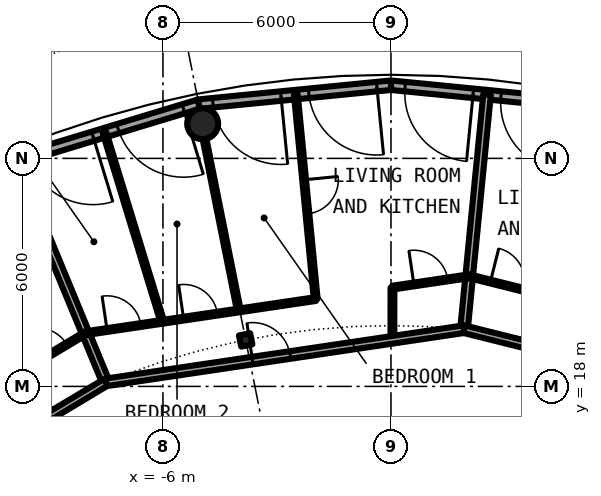
"""IFC4 building model, lengths in metres.
Left out: names, types, materials, properties, quantities, classifications, styles, units other than length and angle.
Written with IfcOpenShell. Run it as: python <this file> out.ifc"""

import sys

from ifc_helpers import new_model, si_unit, direction, frame, frame_2d, origin, origin_2d, place, context, subcontext, project, spatial, rectangle, hollow_circle, i_section, extrude, element, fill, save


model = new_model("IFC4")
c1 = context("Model", 3, precision=1e-05, world=origin(), true_north=direction((0.0, 1.0)))
c2 = subcontext(c1, "Body", "Model", "MODEL_VIEW")
j1 = project(units=[si_unit("LENGTHUNIT", "METRE"), si_unit("PLANEANGLEUNIT", "RADIAN")], contexts=[c1])
p1 = place(None, origin())
s1 = spatial("IfcSite", under=j1, at=p1, CompositionType="ELEMENT")
p2 = place(p1, origin())
s2 = spatial("IfcBuilding", under=s1, at=p2, CompositionType="ELEMENT")
p3 = place(p2, frame((0.0, 0.0, 237.1)))
s3 = spatial("IfcBuildingStorey", under=s2, at=p3, CompositionType="ELEMENT", Elevation=237.1)
p4 = place(p3, frame((-4.955, 24.912, 0.0), z_axis=(0.0, 0.0, 1.0), x_axis=(1.0, 0.0, 0.0)))
e1 = element("IfcColumn", 1, at=p4, inside=s3, PredefinedType="COLUMN", context=c2, shape_type="SweptSolid", body=[
    extrude(hollow_circle(Radius=0.406, WallThickness=0.03, at=origin_2d()), origin(), (0.0, 0.0, 1.0), 3.05),
])
p5 = place(p3, frame((-3.824, 19.223, 0.0), z_axis=(0.0, 0.0, 1.0), x_axis=(-0.195090322016, 0.980785280403, 0.0)))
e2 = element("IfcColumn", 2, at=p5, inside=s3, PredefinedType="COLUMN", context=c2, shape_type="SweptSolid", body=[
    extrude(i_section(OverallWidth=0.3, OverallDepth=0.3, WebThickness=0.011, FlangeThickness=0.019, FilletRadius=0.027, at=origin_2d()), origin(), (0.0, 0.0, 1.0), 3.05),
])
p6 = place(p3, frame((5.058, 25.427, 0.0), z_axis=(0.0, 0.0, 1.0), x_axis=(-0.995187279479, 0.097991217788, 0.0)))
e3 = element("IfcWall", 3, at=p6, inside=s3, PredefinedType="SOLIDWALL", context=c2, shape_type="SweptSolid", body=[
    extrude(rectangle(XDim=5.083, YDim=0.25, at=frame_2d((2.541, 0.0))), origin(), (0.0, 0.0, 1.0), 2.7),
])
p7 = place(p6, frame((0.374, 0.0, 0.0)))
e4 = element("IfcOpeningElement", 4, at=p7, cuts=e3, PredefinedType="OPENING", context=c2, shape_type="SweptSolid", body=[
    extrude(rectangle(XDim=1.8, YDim=2.2, at=frame_2d((0.9, 1.1))), frame((0.0, 0.135, 0.0), z_axis=(0.0, -1.0, 0.0), x_axis=(1.0, 0.0, 0.0)), (0.0, 0.0, 1.0), 0.27),
])
p8 = place(p6, frame((2.909, 0.0, 0.0)))
e5 = element("IfcOpeningElement", 5, at=p8, cuts=e3, PredefinedType="OPENING", context=c2, shape_type="SweptSolid", body=[
    extrude(rectangle(XDim=1.8, YDim=2.2, at=frame_2d((0.9, 1.1))), frame((0.0, 0.135, 0.0), z_axis=(0.0, -1.0, 0.0), x_axis=(1.0, 0.0, 0.0)), (0.0, 0.0, 1.0), 0.27),
])
p9 = place(p3, frame((0.0, 25.925, 0.0), z_axis=(0.0, 0.0, 1.0), x_axis=(-0.995187279479, -0.097991217788, 0.0)))
e6 = element("IfcWall", 6, at=p9, inside=s3, PredefinedType="SOLIDWALL", context=c2, shape_type="SweptSolid", body=[
    extrude(rectangle(XDim=5.083, YDim=0.25, at=frame_2d((2.541, 0.0))), origin(), (0.0, 0.0, 1.0), 2.7),
])
p10 = place(p9, frame((0.374, 0.0, 0.0)))
e7 = element("IfcOpeningElement", 7, at=p10, cuts=e6, PredefinedType="OPENING", context=c2, shape_type="SweptSolid", body=[
    extrude(rectangle(XDim=1.8, YDim=2.2, at=frame_2d((0.9, 1.1))), frame((0.0, 0.135, 0.0), z_axis=(0.0, -1.0, 0.0), x_axis=(1.0, 0.0, 0.0)), (0.0, 0.0, 1.0), 0.27),
])
p11 = place(p9, frame((2.909, 0.0, 0.0)))
e8 = element("IfcOpeningElement", 8, at=p11, cuts=e6, PredefinedType="OPENING", context=c2, shape_type="SweptSolid", body=[
    extrude(rectangle(XDim=1.8, YDim=2.2, at=frame_2d((0.9, 1.1))), frame((0.0, 0.135, 0.0), z_axis=(0.0, -1.0, 0.0), x_axis=(1.0, 0.0, 0.0)), (0.0, 0.0, 1.0), 0.27),
])
p12 = place(p3, frame((-5.058, 25.427, 0.0), z_axis=(0.0, 0.0, 1.0), x_axis=(-0.956941126395, -0.290282070774, 0.0)))
e9 = element("IfcWall", 9, at=p12, inside=s3, PredefinedType="SOLIDWALL", context=c2, shape_type="SweptSolid", body=[
    extrude(rectangle(XDim=5.082, YDim=0.25, at=frame_2d((2.541, 0.0))), origin(), (0.0, 0.0, 1.0), 2.7),
])
p13 = place(p12, frame((0.42, 0.0, 0.0)))
e10 = element("IfcOpeningElement", 10, at=p13, cuts=e9, PredefinedType="OPENING", context=c2, shape_type="SweptSolid", body=[
    extrude(rectangle(XDim=1.8, YDim=2.2, at=frame_2d((0.9, 1.1))), frame((0.0, 0.135, 0.0), z_axis=(0.0, -1.0, 0.0), x_axis=(1.0, 0.0, 0.0)), (0.0, 0.0, 1.0), 0.27),
])
p14 = place(p12, frame((2.909, 0.0, 0.0)))
e11 = element("IfcOpeningElement", 11, at=p14, cuts=e9, PredefinedType="OPENING", context=c2, shape_type="SweptSolid", body=[
    extrude(rectangle(XDim=1.8, YDim=2.2, at=frame_2d((0.9, 1.1))), frame((0.0, 0.135, 0.0), z_axis=(0.0, -1.0, 0.0), x_axis=(1.0, 0.0, 0.0)), (0.0, 0.0, 1.0), 0.27),
])
p15 = place(p3, frame((-9.871, 23.837, 0.0), z_axis=(0.0, 0.0, 1.0), x_axis=(0.382282230395, -0.924045613768, 0.0)))
e12 = element("IfcWall", 12, at=p15, inside=s3, PredefinedType="PARTITIONING", context=c2, shape_type="SweptSolid", body=[
    extrude(rectangle(XDim=6.2, YDim=0.2, at=frame_2d((3.1, 0.0))), origin(), (0.0, 0.0, 1.0), 2.7),
])
p16 = place(p3, frame((0.037, 19.226, 0.0), z_axis=(0.0, 0.0, 1.0), x_axis=(0.001422473668, 0.999998988284, 0.0)))
e13 = element("IfcWall", 13, at=p16, inside=s3, PredefinedType="PARTITIONING", context=c2, shape_type="SweptSolid", body=[
    extrude(rectangle(XDim=1.373, YDim=0.1, at=frame_2d((0.687, 0.0))), origin(), (0.0, 0.0, 1.0), 2.7),
])
p17 = place(p3, frame((-7.537, 24.675, 0.0), z_axis=(0.0, 0.0, 1.0), x_axis=(0.292244771208, -0.956343554222, 0.0)))
e14 = element("IfcWall", 14, at=p17, inside=s3, PredefinedType="PARTITIONING", context=c2, shape_type="SweptSolid", body=[
    extrude(rectangle(XDim=5.201, YDim=0.1, at=frame_2d((2.601, 0.0))), origin(), (0.0, 0.0, 1.0), 2.7),
])
p18 = place(p3, frame((-4.907, 24.515, 0.0), z_axis=(0.0, 0.0, 1.0), x_axis=(0.196299631225, -0.980543958617, 0.0)))
e15 = element("IfcWall", 15, at=p18, inside=s3, PredefinedType="PARTITIONING", context=c2, shape_type="SweptSolid", body=[
    extrude(rectangle(XDim=4.605, YDim=0.1, at=frame_2d((2.303, 0.0))), origin(), (0.0, 0.0, 1.0), 2.7),
])
p19 = place(p3, frame((-2.504, 25.678, 0.0), z_axis=(0.0, 0.0, 1.0), x_axis=(0.096962417892, -0.995288043491, 0.0)))
e16 = element("IfcWall", 16, at=p19, inside=s3, PredefinedType="PARTITIONING", context=c2, shape_type="SweptSolid", body=[
    extrude(rectangle(XDim=5.403, YDim=0.1, at=frame_2d((2.702, 0.0))), origin(), (0.0, 0.0, 1.0), 2.7),
])
p20 = place(p19, frame((2.252, 0.0, 0.0)))
e17 = element("IfcOpeningElement", 17, at=p20, cuts=e16, PredefinedType="OPENING", context=c2, shape_type="SweptSolid", body=[
    extrude(rectangle(XDim=0.9, YDim=2.3, at=frame_2d((0.45, 1.15))), frame((0.0, 0.06, 0.0), z_axis=(0.0, -1.0, 0.0), x_axis=(1.0, 0.0, 0.0)), (0.0, 0.0, 1.0), 0.12),
])
p21 = place(p3, frame((1.921, 19.506, 0.0), z_axis=(0.0, 0.0, 1.0), x_axis=(0.097936222995, 0.995192693013, 0.0)))
e18 = element("IfcWall", 18, at=p21, inside=s3, PredefinedType="PARTITIONING", context=c2, shape_type="SweptSolid", body=[
    extrude(rectangle(XDim=6.2, YDim=0.2, at=frame_2d((3.1, 0.0))), origin(), (0.0, 0.0, 1.0), 2.7),
])
p22 = place(p3, frame((-7.506, 18.105, 0.0), z_axis=(0.0, 0.0, 1.0), x_axis=(0.989134446023, 0.147013767014, 0.0)))
e19 = element("IfcWall", 19, at=p22, inside=s3, PredefinedType="PARTITIONING", context=c2, shape_type="SweptSolid", body=[
    extrude(rectangle(XDim=9.531, YDim=0.2, at=frame_2d((4.765, 0.0))), origin(), (0.0, 0.0, 1.0), 2.45),
])
p23 = place(p22, frame((3.905, 0.0, 0.0)))
e20 = element("IfcOpeningElement", 20, at=p23, cuts=e19, PredefinedType="OPENING", context=c2, shape_type="SweptSolid", body=[
    extrude(rectangle(XDim=1.0, YDim=2.3, at=frame_2d((0.5, 1.15))), frame((0.0, 0.11, 0.0), z_axis=(0.0, -1.0, 0.0), x_axis=(1.0, 0.0, 0.0)), (0.0, 0.0, 1.0), 0.22),
])
p24 = place(p3, frame((-12.439, 15.146, 0.0), z_axis=(0.0, 0.0, 1.0), x_axis=(0.857560257806, 0.514383518624, 0.0)))
e21 = element("IfcWall", 21, at=p24, inside=s3, PredefinedType="PARTITIONING", context=c2, shape_type="SweptSolid", body=[
    extrude(rectangle(XDim=5.758, YDim=0.2, at=frame_2d((2.879, 0.0))), origin(), (0.0, 0.0, 1.0), 2.45),
])
p25 = place(p24, frame((0.307, 0.0, 0.0)))
e22 = element("IfcOpeningElement", 22, at=p25, cuts=e21, PredefinedType="OPENING", context=c2, shape_type="SweptSolid", body=[
    extrude(rectangle(XDim=1.0, YDim=2.3, at=frame_2d((0.5, 1.15))), frame((0.0, 0.11, 0.0), z_axis=(0.0, -1.0, 0.0), x_axis=(1.0, 0.0, 0.0)), (0.0, 0.0, 1.0), 0.22),
])
p26 = place(p3, frame((1.921, 19.506, 0.0), z_axis=(0.0, 0.0, 1.0), x_axis=(0.970012544183, -0.243054858266, 0.0)))
e23 = element("IfcWall", 23, at=p26, inside=s3, PredefinedType="PARTITIONING", context=c2, shape_type="SweptSolid", body=[
    extrude(rectangle(XDim=5.753, YDim=0.2, at=frame_2d((2.876, 0.0))), origin(), (0.0, 0.0, 1.0), 2.45),
])
p27 = place(p26, frame((3.335, 0.0, 0.0)))
e24 = element("IfcOpeningElement", 24, at=p27, cuts=e23, PredefinedType="OPENING", context=c2, shape_type="SweptSolid", body=[
    extrude(rectangle(XDim=1.0, YDim=2.3, at=frame_2d((0.5, 1.15))), frame((0.0, 0.11, 0.0), z_axis=(0.0, -1.0, 0.0), x_axis=(1.0, 0.0, 0.0)), (0.0, 0.0, 1.0), 0.22),
])
p28 = place(p3, frame((-8.039, 19.399, 0.0), z_axis=(0.0, 0.0, 1.0), x_axis=(0.989150987706, 0.14690242857, 0.0)))
e25 = element("IfcWall", 25, at=p28, inside=s3, PredefinedType="PARTITIONING", context=c2, shape_type="SweptSolid", body=[
    extrude(rectangle(XDim=6.127, YDim=0.1, at=frame_2d((3.064, 0.0))), origin(), (0.0, 0.0, 1.0), 2.7),
])
p29 = place(p28, frame((2.611, 0.0, 0.0)))
e26 = element("IfcOpeningElement", 26, at=p29, cuts=e25, PredefinedType="OPENING", context=c2, shape_type="SweptSolid", body=[
    extrude(rectangle(XDim=0.9, YDim=2.3, at=frame_2d((0.45, 1.15))), frame((0.0, 0.06, 0.0), z_axis=(0.0, -1.0, 0.0), x_axis=(1.0, 0.0, 0.0)), (0.0, 0.0, 1.0), 0.12),
])
p30 = place(p28, frame((0.575, 0.0, 0.0)))
e27 = element("IfcOpeningElement", 27, at=p30, cuts=e25, PredefinedType="OPENING", context=c2, shape_type="SweptSolid", body=[
    extrude(rectangle(XDim=0.9, YDim=2.3, at=frame_2d((0.45, 1.15))), frame((0.0, 0.06, 0.0), z_axis=(0.0, -1.0, 0.0), x_axis=(1.0, 0.0, 0.0)), (0.0, 0.0, 1.0), 0.12),
])
p31 = place(p3, frame((0.039, 20.599, 0.0), z_axis=(0.0, 0.0, 1.0), x_axis=(0.989154601185, 0.146878095557, 0.0)))
e28 = element("IfcWall", 28, at=p31, inside=s3, PredefinedType="PARTITIONING", context=c2, shape_type="SweptSolid", body=[
    extrude(rectangle(XDim=2.041, YDim=0.1, at=frame_2d((1.021, 0.0))), origin(), (0.0, 0.0, 1.0), 2.7),
])
p32 = place(p31, frame((0.571, 0.0, 0.0)))
e29 = element("IfcOpeningElement", 29, at=p32, cuts=e28, PredefinedType="OPENING", context=c2, shape_type="SweptSolid", body=[
    extrude(rectangle(XDim=0.9, YDim=2.3, at=frame_2d((0.45, 1.15))), frame((0.0, 0.06, 0.0), z_axis=(0.0, -1.0, 0.0), x_axis=(1.0, 0.0, 0.0)), (0.0, 0.0, 1.0), 0.12),
])
p33 = place(p3, frame((-9.802, 18.342, 0.0), z_axis=(0.0, 0.0, 1.0), x_axis=(0.857670716077, 0.514199322038, 0.0)))
e30 = element("IfcWall", 30, at=p33, inside=s3, PredefinedType="PARTITIONING", context=c2, shape_type="SweptSolid", body=[
    extrude(rectangle(XDim=2.059, YDim=0.1, at=frame_2d((1.03, 0.0))), origin(), (0.0, 0.0, 1.0), 2.7),
])
p34 = place(p33, frame((0.582, 0.0, 0.0)))
e31 = element("IfcOpeningElement", 31, at=p34, cuts=e30, PredefinedType="OPENING", context=c2, shape_type="SweptSolid", body=[
    extrude(rectangle(XDim=0.9, YDim=2.3, at=frame_2d((0.45, 1.15))), frame((0.0, 0.06, 0.0), z_axis=(0.0, -1.0, 0.0), x_axis=(1.0, 0.0, 0.0)), (0.0, 0.0, 1.0), 0.12),
])
p35 = place(p3, frame((2.058, 20.899, 0.0), z_axis=(0.0, 0.0, 1.0), x_axis=(0.970051558088, -0.24289910385, 0.0)))
e32 = element("IfcWall", 32, at=p35, inside=s3, PredefinedType="PARTITIONING", context=c2, shape_type="SweptSolid", body=[
    extrude(rectangle(XDim=2.054, YDim=0.1, at=frame_2d((1.027, 0.0))), origin(), (0.0, 0.0, 1.0), 2.7),
])
p36 = place(p35, frame((0.577, 0.0, 0.0)))
e33 = element("IfcOpeningElement", 33, at=p36, cuts=e32, PredefinedType="OPENING", context=c2, shape_type="SweptSolid", body=[
    extrude(rectangle(XDim=0.9, YDim=2.3, at=frame_2d((0.45, 1.15))), frame((0.0, 0.06, 0.0), z_axis=(0.0, -1.0, 0.0), x_axis=(1.0, 0.0, 0.0)), (0.0, 0.0, 1.0), 0.12),
])
p37 = place(p7, origin())
e34 = element("IfcDoor", 34, at=p37, inside=s3, OperationType="SINGLE_SWING_LEFT", PredefinedType="DOOR", context=c2, shape_type="SweptSolid", body=[
    extrude(rectangle(XDim=1.8, YDim=2.2, at=frame_2d((0.9, 1.1))), frame((0.0, 0.025, 0.0), z_axis=(0.0, -1.0, 0.0), x_axis=(1.0, 0.0, 0.0)), (0.0, 0.0, 1.0), 0.05),
])
fill(e4, e34)
p38 = place(p8, origin())
e35 = element("IfcDoor", 35, at=p38, inside=s3, OperationType="SINGLE_SWING_LEFT", PredefinedType="DOOR", context=c2, shape_type="SweptSolid", body=[
    extrude(rectangle(XDim=1.8, YDim=2.2, at=frame_2d((0.9, 1.1))), frame((0.0, 0.025, 0.0), z_axis=(0.0, -1.0, 0.0), x_axis=(1.0, 0.0, 0.0)), (0.0, 0.0, 1.0), 0.05),
])
fill(e5, e35)
p39 = place(p10, origin())
e36 = element("IfcDoor", 36, at=p39, inside=s3, OperationType="SINGLE_SWING_LEFT", PredefinedType="DOOR", context=c2, shape_type="SweptSolid", body=[
    extrude(rectangle(XDim=1.8, YDim=2.2, at=frame_2d((0.9, 1.1))), frame((0.0, 0.025, 0.0), z_axis=(0.0, -1.0, 0.0), x_axis=(1.0, 0.0, 0.0)), (0.0, 0.0, 1.0), 0.05),
])
fill(e7, e36)
p40 = place(p11, origin())
e37 = element("IfcDoor", 37, at=p40, inside=s3, OperationType="SINGLE_SWING_LEFT", PredefinedType="DOOR", context=c2, shape_type="SweptSolid", body=[
    extrude(rectangle(XDim=1.8, YDim=2.2, at=frame_2d((0.9, 1.1))), frame((0.0, 0.025, 0.0), z_axis=(0.0, -1.0, 0.0), x_axis=(1.0, 0.0, 0.0)), (0.0, 0.0, 1.0), 0.05),
])
fill(e8, e37)
p41 = place(p13, origin())
e38 = element("IfcDoor", 38, at=p41, inside=s3, OperationType="SINGLE_SWING_LEFT", PredefinedType="DOOR", context=c2, shape_type="SweptSolid", body=[
    extrude(rectangle(XDim=1.8, YDim=2.2, at=frame_2d((0.9, 1.1))), frame((0.0, 0.025, 0.0), z_axis=(0.0, -1.0, 0.0), x_axis=(1.0, 0.0, 0.0)), (0.0, 0.0, 1.0), 0.05),
])
fill(e10, e38)
p42 = place(p14, origin())
e39 = element("IfcDoor", 39, at=p42, inside=s3, OperationType="SINGLE_SWING_LEFT", PredefinedType="DOOR", context=c2, shape_type="SweptSolid", body=[
    extrude(rectangle(XDim=1.8, YDim=2.2, at=frame_2d((0.9, 1.1))), frame((0.0, 0.025, 0.0), z_axis=(0.0, -1.0, 0.0), x_axis=(1.0, 0.0, 0.0)), (0.0, 0.0, 1.0), 0.05),
])
fill(e11, e39)
p43 = place(p36, origin())
e40 = element("IfcDoor", 40, at=p43, inside=s3, OperationType="SINGLE_SWING_RIGHT", PredefinedType="DOOR", context=c2, shape_type="SweptSolid", body=[
    extrude(rectangle(XDim=0.9, YDim=2.3, at=frame_2d((0.45, 1.15))), frame((0.0, 0.025, 0.0), z_axis=(0.0, -1.0, 0.0), x_axis=(1.0, 0.0, 0.0)), (0.0, 0.0, 1.0), 0.05),
])
fill(e33, e40)
p44 = place(p23, origin())
e41 = element("IfcDoor", 41, at=p44, inside=s3, OperationType="SINGLE_SWING_LEFT", PredefinedType="DOOR", context=c2, shape_type="SweptSolid", body=[
    extrude(rectangle(XDim=1.0, YDim=2.3, at=frame_2d((0.5, 1.15))), frame((0.0, 0.025, 0.0), z_axis=(0.0, -1.0, 0.0), x_axis=(1.0, 0.0, 0.0)), (0.0, 0.0, 1.0), 0.05),
])
fill(e20, e41)
p45 = place(p32, origin())
e42 = element("IfcDoor", 42, at=p45, inside=s3, OperationType="SINGLE_SWING_RIGHT", PredefinedType="DOOR", context=c2, shape_type="SweptSolid", body=[
    extrude(rectangle(XDim=0.9, YDim=2.3, at=frame_2d((0.45, 1.15))), frame((0.0, 0.025, 0.0), z_axis=(0.0, -1.0, 0.0), x_axis=(1.0, 0.0, 0.0)), (0.0, 0.0, 1.0), 0.05),
])
fill(e29, e42)
p46 = place(p20, origin())
e43 = element("IfcDoor", 43, at=p46, inside=s3, OperationType="SINGLE_SWING_LEFT", PredefinedType="DOOR", context=c2, shape_type="SweptSolid", body=[
    extrude(rectangle(XDim=0.9, YDim=2.3, at=frame_2d((0.45, 1.15))), frame((0.0, 0.025, 0.0), z_axis=(0.0, -1.0, 0.0), x_axis=(1.0, 0.0, 0.0)), (0.0, 0.0, 1.0), 0.05),
])
fill(e17, e43)
p47 = place(p29, origin())
e44 = element("IfcDoor", 44, at=p47, inside=s3, OperationType="SINGLE_SWING_LEFT", PredefinedType="DOOR", context=c2, shape_type="SweptSolid", body=[
    extrude(rectangle(XDim=0.9, YDim=2.3, at=frame_2d((0.45, 1.15))), frame((0.0, 0.025, 0.0), z_axis=(0.0, -1.0, 0.0), x_axis=(1.0, 0.0, 0.0)), (0.0, 0.0, 1.0), 0.05),
])
fill(e26, e44)
p48 = place(p30, origin())
e45 = element("IfcDoor", 45, at=p48, inside=s3, OperationType="SINGLE_SWING_LEFT", PredefinedType="DOOR", context=c2, shape_type="SweptSolid", body=[
    extrude(rectangle(XDim=0.9, YDim=2.3, at=frame_2d((0.45, 1.15))), frame((0.0, 0.025, 0.0), z_axis=(0.0, -1.0, 0.0), x_axis=(1.0, 0.0, 0.0)), (0.0, 0.0, 1.0), 0.05),
])
fill(e27, e45)
p49 = place(p34, origin())
e46 = element("IfcDoor", 46, at=p49, inside=s3, OperationType="SINGLE_SWING_RIGHT", PredefinedType="DOOR", context=c2, shape_type="SweptSolid", body=[
    extrude(rectangle(XDim=0.9, YDim=2.3, at=frame_2d((0.45, 1.15))), frame((0.0, 0.025, 0.0), z_axis=(0.0, -1.0, 0.0), x_axis=(1.0, 0.0, 0.0)), (0.0, 0.0, 1.0), 0.05),
])
fill(e31, e46)
save(model, sys.argv[1])
